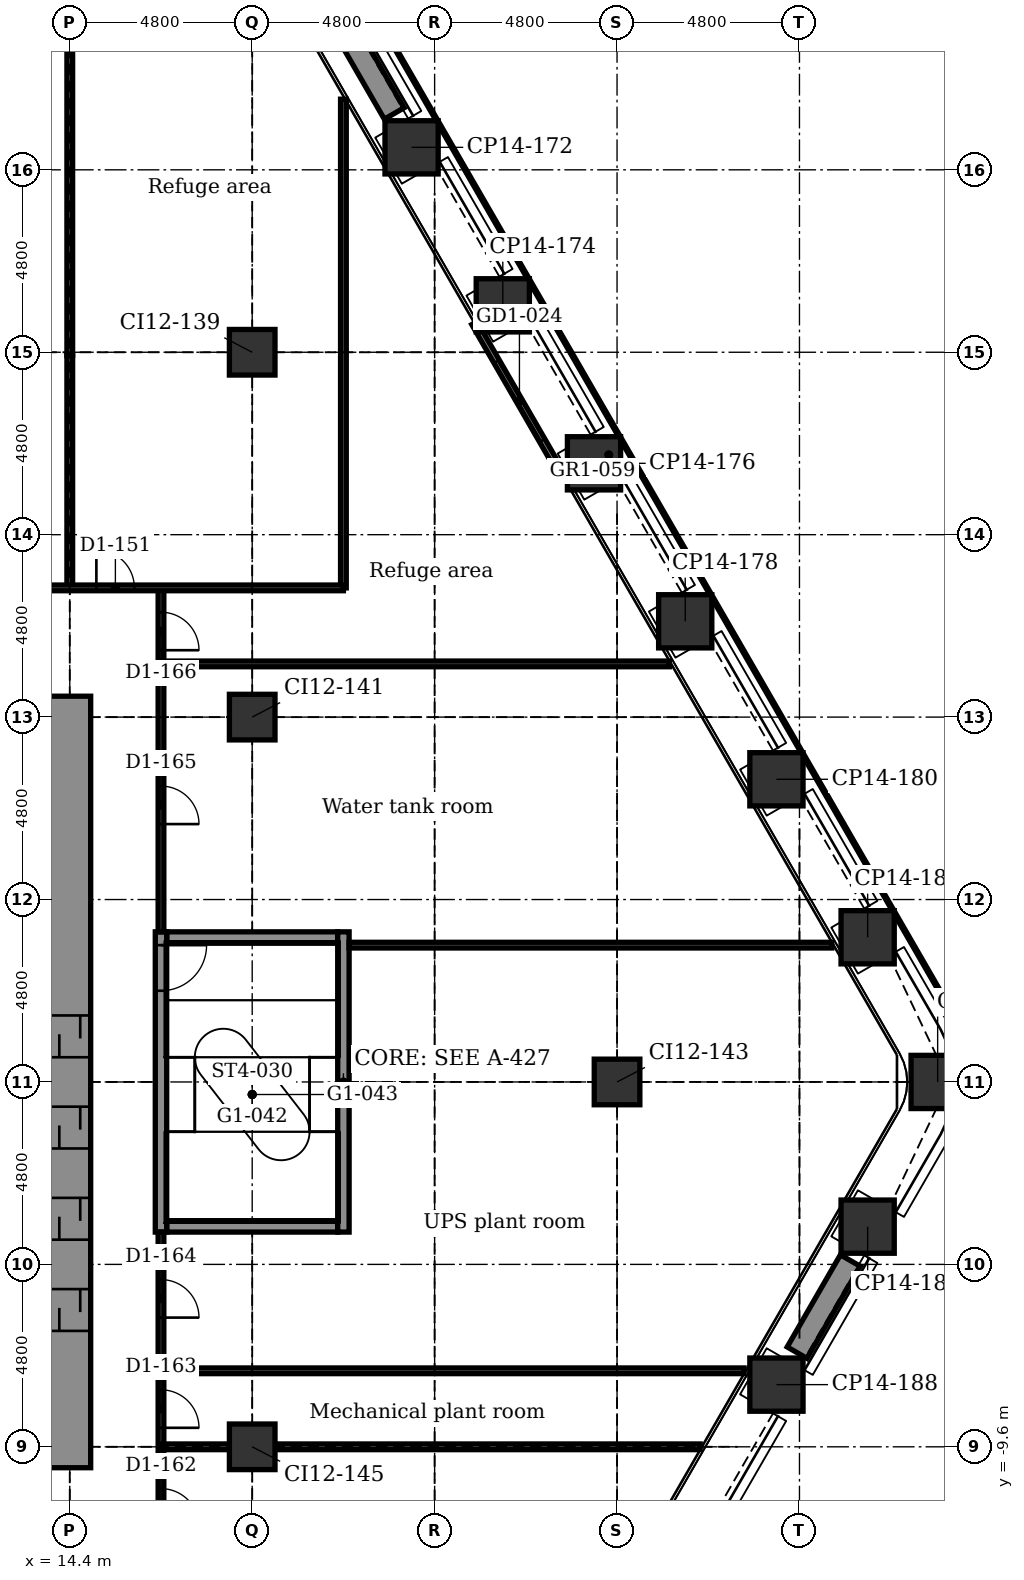
"""IFC4 building model, lengths in metres.
Left out: names, types, materials, properties, quantities, classifications, styles, units other than length and angle.
Written with IfcOpenShell. Run it as: python <this file> out.ifc"""

import sys

from ifc_helpers import new_model, si_unit, direction, frame, frame_2d, origin, origin_2d, place, context, subcontext, project, spatial, rectangle, extrude, element, fill, save


model = new_model("IFC4")
c1 = context("Model", 3, precision=1e-05, world=origin(), true_north=direction((0.0, 1.0)))
c2 = subcontext(c1, "Body", "Model", "MODEL_VIEW")
j1 = project(units=[si_unit("LENGTHUNIT", "METRE"), si_unit("PLANEANGLEUNIT", "RADIAN")], contexts=[c1])
p1 = place(None, origin())
s1 = spatial("IfcSite", under=j1, at=p1, CompositionType="ELEMENT")
p2 = place(p1, origin())
s2 = spatial("IfcBuilding", under=s1, at=p2, CompositionType="ELEMENT")
p3 = place(p2, frame((0.0, 0.0, 66.4)))
s3 = spatial("IfcBuildingStorey", under=s2, at=p3, CompositionType="ELEMENT", Elevation=66.4)
for number, where, z_axis, x_axis in (
    (1, (23.394, 24.592, -0.3), (0.0, 0.0, 1.0), (0.866, 0.5, 0.0)),
    (2, (25.794, 20.435, -0.3), (0.0, 0.0, 1.0), (0.866, 0.5, 0.0)),
    (3, (28.194, 16.278, -0.3), (0.0, 0.0, 1.0), (0.866, 0.5, 0.0)),
    (4, (30.594, 12.121, -0.3), (0.0, 0.0, 1.0), (0.866, 0.5, 0.0)),
    (5, (32.994, 7.964, -0.3), (0.0, 0.0, 1.0), (0.866, 0.5, 0.0)),
    (6, (35.394, 3.807, -0.3), (0.0, 0.0, 1.0), (0.866, 0.5, 0.0)),
    (7, (37.236, 0.0, -0.3), (0.0, 0.0, 1.0), (1.0, 0.0, 0.0)),
    (8, (35.394, -3.807, -0.3), (0.0, 0.0, 1.0), (0.5, 0.866, 0.0)),
    (9, (32.994, -7.964, -0.3), (0.0, 0.0, 1.0), (0.5, 0.866, 0.0)),
):
    element("IfcColumn", number, at=place(p3, frame(where, z_axis=z_axis, x_axis=x_axis)), inside=s3, PredefinedType="COLUMN", context=c2, shape_type="SweptSolid", body=[
        extrude(rectangle(XDim=1.4, YDim=1.4, at=origin_2d()), origin(), (0.0, 0.0, 1.0), 5.5),
    ])
for number, where, z_axis, x_axis in (
    (10, (19.2, -9.6, -0.3), (0.0, 0.0, 1.0), (1.0, 0.0, 0.0)),
    (11, (19.2, 9.6, -0.3), (0.0, 0.0, 1.0), (1.0, 0.0, 0.0)),
    (12, (19.2, 19.2, -0.3), (0.0, 0.0, 1.0), (1.0, 0.0, 0.0)),
    (13, (28.8, 0.0, -0.3), (0.0, 0.0, 1.0), (1.0, 0.0, 0.0)),
):
    element("IfcColumn", number, at=place(p3, frame(where, z_axis=z_axis, x_axis=x_axis)), inside=s3, PredefinedType="COLUMN", context=c2, shape_type="SweptSolid", body=[
        extrude(rectangle(XDim=1.2, YDim=1.2, at=origin_2d()), origin(), (0.0, 0.0, 1.0), 5.5),
    ])
for number, where, z_axis, x_axis in (
    (14, (16.95, -3.8, -0.3), (0.0, 0.0, 1.0), (1.0, 0.0, 0.0)),
    (15, (16.95, 3.8, -0.3), (0.0, 0.0, 1.0), (1.0, 0.0, 0.0)),
):
    element("IfcWall", number, at=place(p3, frame(where, z_axis=z_axis, x_axis=x_axis)), inside=s3, PredefinedType="STANDARD", context=c2, shape_type="SweptSolid", body=[
        extrude(rectangle(XDim=4.5, YDim=0.3, at=frame_2d((2.25, 0.0))), origin(), (0.0, 0.0, 1.0), 5.5),
    ])
p4 = place(p3, frame((14.4, -10.15, -0.3), z_axis=(0.0, 0.0, 1.0), x_axis=(0.0, 1.0, 0.0)))
e16 = element("IfcWall", 16, at=p4, inside=s3, PredefinedType="SHEAR", context=c2, shape_type="SweptSolid", body=[
    extrude(rectangle(XDim=20.3, YDim=1.1, at=frame_2d((10.15, 0.0))), origin(), (0.0, 0.0, 1.0), 5.5),
])
p5 = place(p4, frame((3.6, 0.0, 0.3)))
e17 = element("IfcOpeningElement", 17, at=p5, cuts=e16, PredefinedType="OPENING", context=c2, shape_type="SweptSolid", body=[
    extrude(rectangle(XDim=1.1, YDim=2.1, at=frame_2d((0.55, 1.05))), frame((0.0, 0.56, 0.0), z_axis=(0.0, -1.0, 0.0), x_axis=(1.0, 0.0, 0.0)), (0.0, 0.0, 1.0), 1.12),
])
p6 = place(p4, frame((6.0, 0.0, 0.3)))
e18 = element("IfcOpeningElement", 18, at=p6, cuts=e16, PredefinedType="OPENING", context=c2, shape_type="SweptSolid", body=[
    extrude(rectangle(XDim=1.1, YDim=2.1, at=frame_2d((0.55, 1.05))), frame((0.0, 0.56, 0.0), z_axis=(0.0, -1.0, 0.0), x_axis=(1.0, 0.0, 0.0)), (0.0, 0.0, 1.0), 1.12),
])
p7 = place(p4, frame((8.4, 0.0, 0.3)))
e19 = element("IfcOpeningElement", 19, at=p7, cuts=e16, PredefinedType="OPENING", context=c2, shape_type="SweptSolid", body=[
    extrude(rectangle(XDim=1.1, YDim=2.1, at=frame_2d((0.55, 1.05))), frame((0.0, 0.56, 0.0), z_axis=(0.0, -1.0, 0.0), x_axis=(1.0, 0.0, 0.0)), (0.0, 0.0, 1.0), 1.12),
])
p8 = place(p4, frame((10.8, 0.0, 0.3)))
e20 = element("IfcOpeningElement", 20, at=p8, cuts=e16, PredefinedType="OPENING", context=c2, shape_type="SweptSolid", body=[
    extrude(rectangle(XDim=1.1, YDim=2.1, at=frame_2d((0.55, 1.05))), frame((0.0, 0.56, 0.0), z_axis=(0.0, -1.0, 0.0), x_axis=(1.0, 0.0, 0.0)), (0.0, 0.0, 1.0), 1.12),
])
p9 = place(p3, frame((16.8, -3.95, -0.3), z_axis=(0.0, 0.0, 1.0), x_axis=(0.0, 1.0, 0.0)))
e21 = element("IfcWall", 21, at=p9, inside=s3, PredefinedType="STANDARD", context=c2, shape_type="SweptSolid", body=[
    extrude(rectangle(XDim=7.9, YDim=0.3, at=frame_2d((3.95, 0.0))), origin(), (0.0, 0.0, 1.0), 5.5),
])
p10 = place(p9, frame((6.35, 0.0, 0.3)))
e22 = element("IfcOpeningElement", 22, at=p10, cuts=e21, PredefinedType="OPENING", context=c2, shape_type="SweptSolid", body=[
    extrude(rectangle(XDim=1.2, YDim=2.1, at=frame_2d((0.6, 1.05))), frame((0.0, 0.16, 0.0), z_axis=(0.0, -1.0, 0.0), x_axis=(1.0, 0.0, 0.0)), (0.0, 0.0, 1.0), 0.32),
])
p11 = place(p3, frame((21.6, -3.95, -0.3), z_axis=(0.0, 0.0, 1.0), x_axis=(0.0, 1.0, 0.0)))
e23 = element("IfcWall", 23, at=p11, inside=s3, PredefinedType="STANDARD", context=c2, shape_type="SweptSolid", body=[
    extrude(rectangle(XDim=7.9, YDim=0.3, at=frame_2d((3.95, 0.0))), origin(), (0.0, 0.0, 1.0), 5.5),
])
p12 = place(p3, frame((25.047, 19.969, 0.0), z_axis=(0.0, 0.0, 1.0), x_axis=(0.5000167099, -0.866015756104, 0.0)))
e24 = element("IfcWall", 24, at=p12, inside=s3, PredefinedType="PARTITIONING", context=c2, shape_type="SweptSolid", body=[
    extrude(rectangle(XDim=4.74, YDim=0.16, at=frame_2d((2.37, 0.0))), origin(), (0.0, 0.0, 1.0), 5.2),
])
p13 = place(p12, frame((1.17, 0.0, 0.0)))
e25 = element("IfcOpeningElement", 25, at=p13, cuts=e24, PredefinedType="OPENING", context=c2, shape_type="SweptSolid", body=[
    extrude(rectangle(XDim=2.4, YDim=2.4, at=frame_2d((1.2, 1.2))), frame((0.0, 0.09, 0.0), z_axis=(0.0, -1.0, 0.0), x_axis=(1.0, 0.0, 0.0)), (0.0, 0.0, 1.0), 0.18),
])
for number, where, z_axis, x_axis in (
    (26, (21.537, 27.907, 0.0), (0.0, 0.0, 1.0), (0.5, -0.866, 0.0)),
    (27, (34.937, -4.698, 0.0), (0.0, 0.0, 1.0), (-0.5, -0.866, 0.0)),
):
    element("IfcWall", number, at=place(p3, frame(where, z_axis=z_axis, x_axis=x_axis)), inside=s3, PredefinedType="USERDEFINED", context=c2, shape_type="SweptSolid", body=[
        extrude(rectangle(XDim=2.8, YDim=0.6, at=frame_2d((1.4, 0.0))), origin(), (0.0, 0.0, 1.0), 0.7),
    ])
p14 = place(p3, frame((21.6, 13.0, 0.0), z_axis=(0.0, 0.0, 1.0), x_axis=(0.0, 1.0, 0.0)))
e28 = element("IfcWall", 28, at=p14, inside=s3, PredefinedType="PARTITIONING", context=c2, shape_type="SweptSolid", body=[
    extrude(rectangle(XDim=12.858, YDim=0.15, at=frame_2d((6.429, 0.0))), origin(), (0.0, 0.0, 1.0), 5.2),
])
p15 = place(p3, frame((16.8, -12.4, 0.0), z_axis=(0.0, 0.0, 1.0), x_axis=(0.0, 1.0, 0.0)))
e29 = element("IfcWall", 29, at=p15, inside=s3, PredefinedType="PARTITIONING", context=c2, shape_type="SweptSolid", body=[
    extrude(rectangle(XDim=8.45, YDim=0.15, at=frame_2d((4.225, 0.0))), origin(), (0.0, 0.0, 1.0), 5.2),
])
p16 = place(p15, frame((0.7, 0.0, 0.0)))
e30 = element("IfcOpeningElement", 30, at=p16, cuts=e29, PredefinedType="OPENING", context=c2, shape_type="SweptSolid", body=[
    extrude(rectangle(XDim=1.0, YDim=2.1, at=frame_2d((0.5, 1.05))), frame((0.0, 0.085, 0.0), z_axis=(0.0, -1.0, 0.0), x_axis=(1.0, 0.0, 0.0)), (0.0, 0.0, 1.0), 0.17),
])
p17 = place(p15, frame((3.3, 0.0, 0.0)))
e31 = element("IfcOpeningElement", 31, at=p17, cuts=e29, PredefinedType="OPENING", context=c2, shape_type="SweptSolid", body=[
    extrude(rectangle(XDim=1.0, YDim=2.1, at=frame_2d((0.5, 1.05))), frame((0.0, 0.085, 0.0), z_axis=(0.0, -1.0, 0.0), x_axis=(1.0, 0.0, 0.0)), (0.0, 0.0, 1.0), 0.17),
])
p18 = place(p15, frame((6.2, 0.0, 0.0)))
e32 = element("IfcOpeningElement", 32, at=p18, cuts=e29, PredefinedType="OPENING", context=c2, shape_type="SweptSolid", body=[
    extrude(rectangle(XDim=1.0, YDim=2.1, at=frame_2d((0.5, 1.05))), frame((0.0, 0.085, 0.0), z_axis=(0.0, -1.0, 0.0), x_axis=(1.0, 0.0, 0.0)), (0.0, 0.0, 1.0), 0.17),
])
p19 = place(p3, frame((16.8, 3.95, 0.0), z_axis=(0.0, 0.0, 1.0), x_axis=(0.0, 1.0, 0.0)))
e33 = element("IfcWall", 33, at=p19, inside=s3, PredefinedType="PARTITIONING", context=c2, shape_type="SweptSolid", body=[
    extrude(rectangle(XDim=9.05, YDim=0.15, at=frame_2d((4.525, 0.0))), origin(), (0.0, 0.0, 1.0), 5.2),
])
p20 = place(p19, frame((2.835, 0.0, 0.0)))
e34 = element("IfcOpeningElement", 34, at=p20, cuts=e33, PredefinedType="OPENING", context=c2, shape_type="SweptSolid", body=[
    extrude(rectangle(XDim=1.0, YDim=2.1, at=frame_2d((0.5, 1.05))), frame((0.0, 0.085, 0.0), z_axis=(0.0, -1.0, 0.0), x_axis=(1.0, 0.0, 0.0)), (0.0, 0.0, 1.0), 0.17),
])
p21 = place(p19, frame((7.41, 0.0, 0.0)))
e35 = element("IfcOpeningElement", 35, at=p21, cuts=e33, PredefinedType="OPENING", context=c2, shape_type="SweptSolid", body=[
    extrude(rectangle(XDim=1.0, YDim=2.1, at=frame_2d((0.5, 1.05))), frame((0.0, 0.085, 0.0), z_axis=(0.0, -1.0, 0.0), x_axis=(1.0, 0.0, 0.0)), (0.0, 0.0, 1.0), 0.17),
])
p22 = place(p3, frame((14.4, 19.113, 0.0), z_axis=(0.0, 0.0, 1.0), x_axis=(0.0, 1.0, 0.0)))
e36 = element("IfcWall", 36, at=p22, inside=s3, PredefinedType="PARTITIONING", context=c2, shape_type="SweptSolid", body=[
    extrude(rectangle(XDim=12.472, YDim=0.15, at=frame_2d((6.236, 0.0))), origin(), (0.0, 0.0, 1.0), 4.516),
])
p23 = place(p3, frame((14.4, 13.0, 0.0), z_axis=(0.0, 0.0, 1.0), x_axis=(0.0, 1.0, 0.0)))
e37 = element("IfcWall", 37, at=p23, inside=s3, PredefinedType="PARTITIONING", context=c2, shape_type="SweptSolid", body=[
    extrude(rectangle(XDim=6.113, YDim=0.15, at=frame_2d((3.057, 0.0))), origin(), (0.0, 0.0, 1.0), 4.743),
])
p24 = place(p3, frame((16.8, -9.6, 0.0), z_axis=(0.0, 0.0, 1.0), x_axis=(1.0, 0.0, 0.0)))
e38 = element("IfcWall", 38, at=p24, inside=s3, PredefinedType="PARTITIONING", context=c2, shape_type="SweptSolid", body=[
    extrude(rectangle(XDim=1.8, YDim=0.15, at=frame_2d((0.9, 0.0))), origin(), (0.0, 0.0, 1.0), 4.592),
])
p25 = place(p3, frame((19.8, -9.6, 0.0), z_axis=(0.0, 0.0, 1.0), x_axis=(1.0, 0.0, 0.0)))
e39 = element("IfcWall", 39, at=p25, inside=s3, PredefinedType="PARTITIONING", context=c2, shape_type="SweptSolid", body=[
    extrude(rectangle(XDim=11.187, YDim=0.15, at=frame_2d((5.593, 0.0))), origin(), (0.0, 0.0, 1.0), 4.438),
])
p26 = place(p3, frame((16.8, -7.6, 0.0), z_axis=(0.0, 0.0, 1.0), x_axis=(1.0, 0.0, 0.0)))
e40 = element("IfcWall", 40, at=p26, inside=s3, PredefinedType="PARTITIONING", context=c2, shape_type="SweptSolid", body=[
    extrude(rectangle(XDim=15.342, YDim=0.15, at=frame_2d((7.671, 0.0))), origin(), (0.0, 0.0, 1.0), 5.2),
])
p27 = place(p3, frame((21.75, 3.6, 0.0), z_axis=(0.0, 0.0, 1.0), x_axis=(1.0, 0.0, 0.0)))
e41 = element("IfcWall", 41, at=p27, inside=s3, PredefinedType="PARTITIONING", context=c2, shape_type="SweptSolid", body=[
    extrude(rectangle(XDim=12.701, YDim=0.15, at=frame_2d((6.351, 0.0))), origin(), (0.0, 0.0, 1.0), 5.2),
])
p28 = place(p3, frame((16.8, 11.0, 0.0), z_axis=(0.0, 0.0, 1.0), x_axis=(1.0, 0.0, 0.0)))
e42 = element("IfcWall", 42, at=p28, inside=s3, PredefinedType="PARTITIONING", context=c2, shape_type="SweptSolid", body=[
    extrude(rectangle(XDim=13.378, YDim=0.15, at=frame_2d((6.689, 0.0))), origin(), (0.0, 0.0, 1.0), 5.2),
])
p29 = place(p3, frame((-21.6, 13.0, 0.0), z_axis=(0.0, 0.0, 1.0), x_axis=(1.0, 0.0, 0.0)))
e43 = element("IfcWall", 43, at=p29, inside=s3, PredefinedType="PARTITIONING", context=c2, shape_type="SweptSolid", body=[
    extrude(rectangle(XDim=43.2, YDim=0.15, at=frame_2d((21.6, 0.0))), origin(), (0.0, 0.0, 1.0), 5.2),
])
p30 = place(p29, frame((6.7, 0.0, 0.0)))
e44 = element("IfcOpeningElement", 44, at=p30, cuts=e43, PredefinedType="OPENING", context=c2, shape_type="SweptSolid", body=[
    extrude(rectangle(XDim=1.0, YDim=2.1, at=frame_2d((0.5, 1.05))), frame((0.0, 0.085, 0.0), z_axis=(0.0, -1.0, 0.0), x_axis=(1.0, 0.0, 0.0)), (0.0, 0.0, 1.0), 0.17),
])
p31 = place(p29, frame((10.3, 0.0, 0.0)))
e45 = element("IfcOpeningElement", 45, at=p31, cuts=e43, PredefinedType="OPENING", context=c2, shape_type="SweptSolid", body=[
    extrude(rectangle(XDim=1.0, YDim=2.1, at=frame_2d((0.5, 1.05))), frame((0.0, 0.085, 0.0), z_axis=(0.0, -1.0, 0.0), x_axis=(1.0, 0.0, 0.0)), (0.0, 0.0, 1.0), 0.17),
])
p32 = place(p29, frame((13.9, 0.0, 0.0)))
e46 = element("IfcOpeningElement", 46, at=p32, cuts=e43, PredefinedType="OPENING", context=c2, shape_type="SweptSolid", body=[
    extrude(rectangle(XDim=1.0, YDim=2.1, at=frame_2d((0.5, 1.05))), frame((0.0, 0.085, 0.0), z_axis=(0.0, -1.0, 0.0), x_axis=(1.0, 0.0, 0.0)), (0.0, 0.0, 1.0), 0.17),
])
p33 = place(p29, frame((18.7, 0.0, 0.0)))
e47 = element("IfcOpeningElement", 47, at=p33, cuts=e43, PredefinedType="OPENING", context=c2, shape_type="SweptSolid", body=[
    extrude(rectangle(XDim=1.0, YDim=2.1, at=frame_2d((0.5, 1.05))), frame((0.0, 0.085, 0.0), z_axis=(0.0, -1.0, 0.0), x_axis=(1.0, 0.0, 0.0)), (0.0, 0.0, 1.0), 0.17),
])
p34 = place(p29, frame((23.5, 0.0, 0.0)))
e48 = element("IfcOpeningElement", 48, at=p34, cuts=e43, PredefinedType="OPENING", context=c2, shape_type="SweptSolid", body=[
    extrude(rectangle(XDim=1.0, YDim=2.1, at=frame_2d((0.5, 1.05))), frame((0.0, 0.085, 0.0), z_axis=(0.0, -1.0, 0.0), x_axis=(1.0, 0.0, 0.0)), (0.0, 0.0, 1.0), 0.17),
])
p35 = place(p29, frame((28.3, 0.0, 0.0)))
e49 = element("IfcOpeningElement", 49, at=p35, cuts=e43, PredefinedType="OPENING", context=c2, shape_type="SweptSolid", body=[
    extrude(rectangle(XDim=1.0, YDim=2.1, at=frame_2d((0.5, 1.05))), frame((0.0, 0.085, 0.0), z_axis=(0.0, -1.0, 0.0), x_axis=(1.0, 0.0, 0.0)), (0.0, 0.0, 1.0), 0.17),
])
p36 = place(p29, frame((33.1, 0.0, 0.0)))
e50 = element("IfcOpeningElement", 50, at=p36, cuts=e43, PredefinedType="OPENING", context=c2, shape_type="SweptSolid", body=[
    extrude(rectangle(XDim=1.0, YDim=2.1, at=frame_2d((0.5, 1.05))), frame((0.0, 0.085, 0.0), z_axis=(0.0, -1.0, 0.0), x_axis=(1.0, 0.0, 0.0)), (0.0, 0.0, 1.0), 0.17),
])
p37 = place(p29, frame((36.7, 0.0, 0.0)))
e51 = element("IfcOpeningElement", 51, at=p37, cuts=e43, PredefinedType="OPENING", context=c2, shape_type="SweptSolid", body=[
    extrude(rectangle(XDim=1.0, YDim=2.1, at=frame_2d((0.5, 1.05))), frame((0.0, 0.085, 0.0), z_axis=(0.0, -1.0, 0.0), x_axis=(1.0, 0.0, 0.0)), (0.0, 0.0, 1.0), 0.17),
])
p38 = place(p13, origin())
e52 = element("IfcDoor", 52, at=p38, inside=s3, OperationType="DOUBLE_DOOR_SLIDING", PredefinedType="DOOR", context=c2, shape_type="SweptSolid", body=[
    extrude(rectangle(XDim=2.4, YDim=2.4, at=frame_2d((1.2, 1.2))), frame((0.0, 0.025, 0.0), z_axis=(0.0, -1.0, 0.0), x_axis=(1.0, 0.0, 0.0)), (0.0, 0.0, 1.0), 0.05),
])
fill(e25, e52)
p39 = place(p37, origin())
e53 = element("IfcDoor", 53, at=p39, inside=s3, OperationType="SINGLE_SWING_LEFT", PredefinedType="DOOR", context=c2, shape_type="SweptSolid", body=[
    extrude(rectangle(XDim=1.0, YDim=2.1, at=frame_2d((0.5, 1.05))), frame((0.0, 0.025, 0.0), z_axis=(0.0, -1.0, 0.0), x_axis=(1.0, 0.0, 0.0)), (0.0, 0.0, 1.0), 0.05),
])
fill(e51, e53)
p40 = place(p16, frame((1.0, 0.0, 0.0), z_axis=(0.0, 0.0, 1.0), x_axis=(-1.0, 0.0, 0.0)))
e54 = element("IfcDoor", 54, at=p40, inside=s3, OperationType="SINGLE_SWING_LEFT", PredefinedType="DOOR", context=c2, shape_type="SweptSolid", body=[
    extrude(rectangle(XDim=1.0, YDim=2.1, at=frame_2d((0.5, 1.05))), frame((0.0, 0.025, 0.0), z_axis=(0.0, -1.0, 0.0), x_axis=(1.0, 0.0, 0.0)), (0.0, 0.0, 1.0), 0.05),
])
fill(e30, e54)
p41 = place(p17, frame((1.0, 0.0, 0.0), z_axis=(0.0, 0.0, 1.0), x_axis=(-1.0, 0.0, 0.0)))
e55 = element("IfcDoor", 55, at=p41, inside=s3, OperationType="SINGLE_SWING_LEFT", PredefinedType="DOOR", context=c2, shape_type="SweptSolid", body=[
    extrude(rectangle(XDim=1.0, YDim=2.1, at=frame_2d((0.5, 1.05))), frame((0.0, 0.025, 0.0), z_axis=(0.0, -1.0, 0.0), x_axis=(1.0, 0.0, 0.0)), (0.0, 0.0, 1.0), 0.05),
])
fill(e31, e55)
p42 = place(p18, frame((1.0, 0.0, 0.0), z_axis=(0.0, 0.0, 1.0), x_axis=(-1.0, 0.0, 0.0)))
e56 = element("IfcDoor", 56, at=p42, inside=s3, OperationType="SINGLE_SWING_LEFT", PredefinedType="DOOR", context=c2, shape_type="SweptSolid", body=[
    extrude(rectangle(XDim=1.0, YDim=2.1, at=frame_2d((0.5, 1.05))), frame((0.0, 0.025, 0.0), z_axis=(0.0, -1.0, 0.0), x_axis=(1.0, 0.0, 0.0)), (0.0, 0.0, 1.0), 0.05),
])
fill(e32, e56)
p43 = place(p20, frame((1.0, 0.0, 0.0), z_axis=(0.0, 0.0, 1.0), x_axis=(-1.0, 0.0, 0.0)))
e57 = element("IfcDoor", 57, at=p43, inside=s3, OperationType="SINGLE_SWING_LEFT", PredefinedType="DOOR", context=c2, shape_type="SweptSolid", body=[
    extrude(rectangle(XDim=1.0, YDim=2.1, at=frame_2d((0.5, 1.05))), frame((0.0, 0.025, 0.0), z_axis=(0.0, -1.0, 0.0), x_axis=(1.0, 0.0, 0.0)), (0.0, 0.0, 1.0), 0.05),
])
fill(e34, e57)
p44 = place(p21, frame((1.0, 0.0, 0.0), z_axis=(0.0, 0.0, 1.0), x_axis=(-1.0, 0.0, 0.0)))
e58 = element("IfcDoor", 58, at=p44, inside=s3, OperationType="SINGLE_SWING_LEFT", PredefinedType="DOOR", context=c2, shape_type="SweptSolid", body=[
    extrude(rectangle(XDim=1.0, YDim=2.1, at=frame_2d((0.5, 1.05))), frame((0.0, 0.025, 0.0), z_axis=(0.0, -1.0, 0.0), x_axis=(1.0, 0.0, 0.0)), (0.0, 0.0, 1.0), 0.05),
])
fill(e35, e58)
p45 = place(p5, origin())
e59 = element("IfcDoor", 59, at=p45, inside=s3, OperationType="DOUBLE_DOOR_SLIDING", PredefinedType="DOOR", context=c2, shape_type="SweptSolid", body=[
    extrude(rectangle(XDim=1.1, YDim=2.1, at=frame_2d((0.55, 1.05))), frame((0.0, 0.025, 0.0), z_axis=(0.0, -1.0, 0.0), x_axis=(1.0, 0.0, 0.0)), (0.0, 0.0, 1.0), 0.05),
])
fill(e17, e59)
p46 = place(p6, origin())
e60 = element("IfcDoor", 60, at=p46, inside=s3, OperationType="DOUBLE_DOOR_SLIDING", PredefinedType="DOOR", context=c2, shape_type="SweptSolid", body=[
    extrude(rectangle(XDim=1.1, YDim=2.1, at=frame_2d((0.55, 1.05))), frame((0.0, 0.025, 0.0), z_axis=(0.0, -1.0, 0.0), x_axis=(1.0, 0.0, 0.0)), (0.0, 0.0, 1.0), 0.05),
])
fill(e18, e60)
p47 = place(p7, origin())
e61 = element("IfcDoor", 61, at=p47, inside=s3, OperationType="DOUBLE_DOOR_SLIDING", PredefinedType="DOOR", context=c2, shape_type="SweptSolid", body=[
    extrude(rectangle(XDim=1.1, YDim=2.1, at=frame_2d((0.55, 1.05))), frame((0.0, 0.025, 0.0), z_axis=(0.0, -1.0, 0.0), x_axis=(1.0, 0.0, 0.0)), (0.0, 0.0, 1.0), 0.05),
])
fill(e19, e61)
p48 = place(p8, origin())
e62 = element("IfcDoor", 62, at=p48, inside=s3, OperationType="DOUBLE_DOOR_SLIDING", PredefinedType="DOOR", context=c2, shape_type="SweptSolid", body=[
    extrude(rectangle(XDim=1.1, YDim=2.1, at=frame_2d((0.55, 1.05))), frame((0.0, 0.025, 0.0), z_axis=(0.0, -1.0, 0.0), x_axis=(1.0, 0.0, 0.0)), (0.0, 0.0, 1.0), 0.05),
])
fill(e20, e62)
p49 = place(p10, frame((1.2, 0.0, 0.0), z_axis=(0.0, 0.0, 1.0), x_axis=(-1.0, 0.0, 0.0)))
e63 = element("IfcDoor", 63, at=p49, inside=s3, OperationType="SINGLE_SWING_RIGHT", PredefinedType="DOOR", context=c2, shape_type="SweptSolid", body=[
    extrude(rectangle(XDim=1.2, YDim=2.1, at=frame_2d((0.6, 1.05))), frame((0.0, 0.025, 0.0), z_axis=(0.0, -1.0, 0.0), x_axis=(1.0, 0.0, 0.0)), (0.0, 0.0, 1.0), 0.05),
])
fill(e22, e63)
save(model, sys.argv[1])
